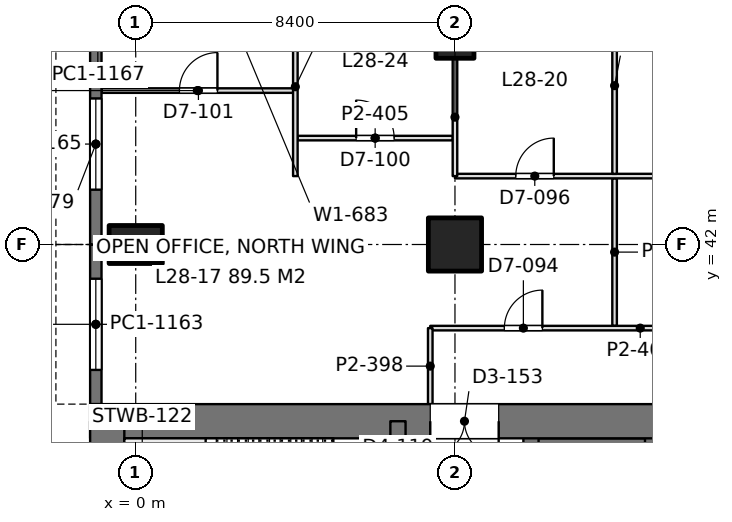
"""IFC4 building model, lengths in metres.
Left out: names, types, materials, properties, quantities, classifications, styles, units other than length and angle.
Written with IfcOpenShell. Run it as: python <this file> out.ifc"""

import sys

from ifc_helpers import new_model, si_unit, direction, frame, frame_2d, origin, origin_2d, place, context, subcontext, project, spatial, rectangle, extrude, element, fill, save


model = new_model("IFC4")
c1 = context("Model", 3, precision=1e-05, world=origin(), true_north=direction((0.0, 1.0)))
c2 = subcontext(c1, "Body", "Model", "MODEL_VIEW")
j1 = project(units=[si_unit("LENGTHUNIT", "METRE"), si_unit("PLANEANGLEUNIT", "RADIAN")], contexts=[c1])
p1 = place(None, origin())
s1 = spatial("IfcSite", under=j1, at=p1, CompositionType="ELEMENT")
p2 = place(p1, origin())
s2 = spatial("IfcBuilding", under=s1, at=p2, CompositionType="ELEMENT")
p3 = place(p2, frame((0.0, 0.0, 126.0)))
s3 = spatial("IfcBuildingStorey", under=s2, at=p3, CompositionType="ELEMENT", Elevation=126.0)
p4 = place(p3, frame((0.0, 42.0, 0.0), z_axis=(0.0, 0.0, 1.0), x_axis=(0.0, 1.0, 0.0)))
e1 = element("IfcColumn", 1, at=p4, inside=s3, PredefinedType="COLUMN", context=c2, shape_type="SweptSolid", body=[
    extrude(rectangle(XDim=1.0, YDim=1.4, at=origin_2d()), origin(), (0.0, 0.0, 1.0), 4.2),
])
p5 = place(p3, frame((8.4, 42.0, 0.0), z_axis=(0.0, 0.0, 1.0), x_axis=(1.0, 0.0, 0.0)))
e2 = element("IfcColumn", 2, at=p5, inside=s3, PredefinedType="COLUMN", context=c2, shape_type="SweptSolid", body=[
    extrude(rectangle(XDim=1.4, YDim=1.4, at=origin_2d()), origin(), (0.0, 0.0, 1.0), 4.2),
])
p6 = place(p3, frame((8.4, 47.6, 0.0), z_axis=(0.0, 0.0, 1.0), x_axis=(1.0, 0.0, 0.0)))
e3 = element("IfcColumn", 3, at=p6, inside=s3, PredefinedType="COLUMN", context=c2, shape_type="SweptSolid", body=[
    extrude(rectangle(XDim=1.0, YDim=1.4, at=origin_2d()), origin(), (0.0, 0.0, 1.0), 4.2),
])
p7 = place(p3, frame((-1.2, 37.35, 0.0), z_axis=(0.0, 0.0, 1.0), x_axis=(1.0, 0.0, 0.0)))
e4 = element("IfcWall", 4, at=p7, inside=s3, PredefinedType="SHEAR", context=c2, shape_type="SweptSolid", body=[
    extrude(rectangle(XDim=18.0, YDim=0.9, at=frame_2d((9.0, 0.0))), origin(), (0.0, 0.0, 1.0), 4.2),
])
p8 = place(p7, frame((8.95, 0.0, 0.0)))
e5 = element("IfcOpeningElement", 5, at=p8, cuts=e4, PredefinedType="OPENING", context=c2, shape_type="SweptSolid", body=[
    extrude(rectangle(XDim=1.8, YDim=2.4, at=frame_2d((0.9, 1.2))), frame((0.0, 0.46, 0.0), z_axis=(0.0, -1.0, 0.0), x_axis=(1.0, 0.0, 0.0)), (0.0, 0.0, 1.0), 0.92),
])
p9 = place(p3, frame((-0.75, 13.05, 0.0), z_axis=(0.0, 0.0, 1.0), x_axis=(0.0, 1.0, 0.0)))
e6 = element("IfcWall", 6, at=p9, inside=s3, PredefinedType="SHEAR", context=c2, shape_type="SweptSolid", body=[
    extrude(rectangle(XDim=24.3, YDim=0.9, at=frame_2d((12.15, 0.0))), origin(), (0.0, 0.0, 1.0), 4.2),
])
p10 = place(p3, frame((6.9, 13.05, 0.0), z_axis=(0.0, 0.0, 1.0), x_axis=(0.0, 1.0, 0.0)))
e7 = element("IfcWall", 7, at=p10, inside=s3, PredefinedType="SHEAR", context=c2, shape_type="SweptSolid", body=[
    extrude(rectangle(XDim=24.3, YDim=0.4, at=frame_2d((12.15, 0.0))), origin(), (0.0, 0.0, 1.0), 4.2),
])
p11 = place(p10, frame((1.3, 0.0, 0.0)))
e8 = element("IfcOpeningElement", 8, at=p11, cuts=e7, PredefinedType="OPENING", context=c2, shape_type="SweptSolid", body=[
    extrude(rectangle(XDim=1.0, YDim=2.2, at=frame_2d((0.5, 1.1))), frame((0.0, 0.21, 0.0), z_axis=(0.0, -1.0, 0.0), x_axis=(1.0, 0.0, 0.0)), (0.0, 0.0, 1.0), 0.42),
])
p12 = place(p10, frame((22.0, 0.0, 0.0)))
e9 = element("IfcOpeningElement", 9, at=p12, cuts=e7, PredefinedType="OPENING", context=c2, shape_type="SweptSolid", body=[
    extrude(rectangle(XDim=1.0, YDim=2.2, at=frame_2d((0.5, 1.1))), frame((0.0, 0.21, 0.0), z_axis=(0.0, -1.0, 0.0), x_axis=(1.0, 0.0, 0.0)), (0.0, 0.0, 1.0), 0.42),
])
p13 = place(p10, frame((5.55, 0.0, 0.0)))
e10 = element("IfcOpeningElement", 10, at=p13, cuts=e7, PredefinedType="OPENING", context=c2, shape_type="SweptSolid", body=[
    extrude(rectangle(XDim=1.0, YDim=2.2, at=frame_2d((0.5, 1.1))), frame((0.0, 0.21, 0.0), z_axis=(0.0, -1.0, 0.0), x_axis=(1.0, 0.0, 0.0)), (0.0, 0.0, 1.0), 0.42),
])
p14 = place(p10, frame((9.55, 0.0, 0.0)))
e11 = element("IfcOpeningElement", 11, at=p14, cuts=e7, PredefinedType="OPENING", context=c2, shape_type="SweptSolid", body=[
    extrude(rectangle(XDim=1.0, YDim=2.2, at=frame_2d((0.5, 1.1))), frame((0.0, 0.21, 0.0), z_axis=(0.0, -1.0, 0.0), x_axis=(1.0, 0.0, 0.0)), (0.0, 0.0, 1.0), 0.42),
])
p15 = place(p10, frame((12.8, 0.0, 0.0)))
e12 = element("IfcOpeningElement", 12, at=p15, cuts=e7, PredefinedType="OPENING", context=c2, shape_type="SweptSolid", body=[
    extrude(rectangle(XDim=1.1, YDim=2.2, at=frame_2d((0.55, 1.1))), frame((0.0, 0.21, 0.0), z_axis=(0.0, -1.0, 0.0), x_axis=(1.0, 0.0, 0.0)), (0.0, 0.0, 1.0), 0.42),
])
p16 = place(p10, frame((15.538, 0.0, 0.0)))
e13 = element("IfcOpeningElement", 13, at=p16, cuts=e7, PredefinedType="OPENING", context=c2, shape_type="SweptSolid", body=[
    extrude(rectangle(XDim=1.1, YDim=2.2, at=frame_2d((0.55, 1.1))), frame((0.0, 0.21, 0.0), z_axis=(0.0, -1.0, 0.0), x_axis=(1.0, 0.0, 0.0)), (0.0, 0.0, 1.0), 0.42),
])
p17 = place(p10, frame((18.262, 0.0, 0.0)))
e14 = element("IfcOpeningElement", 14, at=p17, cuts=e7, PredefinedType="OPENING", context=c2, shape_type="SweptSolid", body=[
    extrude(rectangle(XDim=1.1, YDim=2.2, at=frame_2d((0.55, 1.1))), frame((0.0, 0.21, 0.0), z_axis=(0.0, -1.0, 0.0), x_axis=(1.0, 0.0, 0.0)), (0.0, 0.0, 1.0), 0.42),
])
p18 = place(p3, frame((10.4, 13.05, 0.0), z_axis=(0.0, 0.0, 1.0), x_axis=(0.0, 1.0, 0.0)))
e15 = element("IfcWall", 15, at=p18, inside=s3, PredefinedType="SHEAR", context=c2, shape_type="SweptSolid", body=[
    extrude(rectangle(XDim=24.3, YDim=0.4, at=frame_2d((12.15, 0.0))), origin(), (0.0, 0.0, 1.0), 4.2),
])
p19 = place(p18, frame((10.05, 0.0, 0.0)))
e16 = element("IfcOpeningElement", 16, at=p19, cuts=e15, PredefinedType="OPENING", context=c2, shape_type="SweptSolid", body=[
    extrude(rectangle(XDim=1.1, YDim=2.2, at=frame_2d((0.55, 1.1))), frame((0.0, 0.21, 0.0), z_axis=(0.0, -1.0, 0.0), x_axis=(1.0, 0.0, 0.0)), (0.0, 0.0, 1.0), 0.42),
])
p20 = place(p18, frame((12.9, 0.0, 0.0)))
e17 = element("IfcOpeningElement", 17, at=p20, cuts=e15, PredefinedType="OPENING", context=c2, shape_type="SweptSolid", body=[
    extrude(rectangle(XDim=1.1, YDim=2.2, at=frame_2d((0.55, 1.1))), frame((0.0, 0.21, 0.0), z_axis=(0.0, -1.0, 0.0), x_axis=(1.0, 0.0, 0.0)), (0.0, 0.0, 1.0), 0.42),
])
p21 = place(p18, frame((21.45, 0.0, 0.0)))
e18 = element("IfcOpeningElement", 18, at=p21, cuts=e15, PredefinedType="OPENING", context=c2, shape_type="SweptSolid", body=[
    extrude(rectangle(XDim=1.1, YDim=2.2, at=frame_2d((0.55, 1.1))), frame((0.0, 0.21, 0.0), z_axis=(0.0, -1.0, 0.0), x_axis=(1.0, 0.0, 0.0)), (0.0, 0.0, 1.0), 0.42),
])
p22 = place(p18, frame((2.35, 0.0, 0.0)))
e19 = element("IfcOpeningElement", 19, at=p22, cuts=e15, PredefinedType="OPENING", context=c2, shape_type="SweptSolid", body=[
    extrude(rectangle(XDim=1.8, YDim=2.4, at=frame_2d((0.9, 1.2))), frame((0.0, 0.21, 0.0), z_axis=(0.0, -1.0, 0.0), x_axis=(1.0, 0.0, 0.0)), (0.0, 0.0, 1.0), 0.42),
])
p23 = place(p18, frame((5.8, 0.0, 0.0)))
e20 = element("IfcOpeningElement", 20, at=p23, cuts=e15, PredefinedType="OPENING", context=c2, shape_type="SweptSolid", body=[
    extrude(rectangle(XDim=1.8, YDim=2.4, at=frame_2d((0.9, 1.2))), frame((0.0, 0.21, 0.0), z_axis=(0.0, -1.0, 0.0), x_axis=(1.0, 0.0, 0.0)), (0.0, 0.0, 1.0), 0.42),
])
p24 = place(p3, frame((13.6, 22.225, 0.0), z_axis=(0.0, 0.0, 1.0), x_axis=(0.0, 1.0, 0.0)))
e21 = element("IfcWall", 21, at=p24, inside=s3, PredefinedType="SHEAR", context=c2, shape_type="SweptSolid", body=[
    extrude(rectangle(XDim=15.125, YDim=0.4, at=frame_2d((7.562, 0.0))), origin(), (0.0, 0.0, 1.0), 4.2),
])
p25 = place(p3, frame((10.4, 36.625, 0.0), z_axis=(0.0, 0.0, 1.0), x_axis=(1.0, 0.0, 0.0)))
e22 = element("IfcWall", 22, at=p25, inside=s3, PredefinedType="SHEAR", context=c2, shape_type="SweptSolid", body=[
    extrude(rectangle(XDim=3.2, YDim=0.55, at=frame_2d((1.6, 0.0))), origin(), (0.0, 0.0, 1.0), 4.2),
])
p26 = place(p3, frame((-1.05, 37.8, 0.0), z_axis=(0.0, 0.0, 1.0), x_axis=(0.0, 1.0, 0.0)))
e23 = element("IfcWall", 23, at=p26, inside=s3, PredefinedType="SOLIDWALL", context=c2, shape_type="SweptSolid", body=[
    extrude(rectangle(XDim=4.2, YDim=0.3, at=frame_2d((2.1, 0.0))), origin(), (0.0, 0.0, 1.0), 4.05),
])
p27 = place(p26, frame((0.9, 0.0, 0.9)))
e24 = element("IfcOpeningElement", 24, at=p27, cuts=e23, PredefinedType="OPENING", context=c2, shape_type="SweptSolid", body=[
    extrude(rectangle(XDim=2.4, YDim=1.9, at=frame_2d((1.2, 0.95))), frame((0.0, 0.16, 0.0), z_axis=(0.0, -1.0, 0.0), x_axis=(1.0, 0.0, 0.0)), (0.0, 0.0, 1.0), 0.32),
])
p28 = place(p3, frame((-1.05, 42.0, 0.0), z_axis=(0.0, 0.0, 1.0), x_axis=(0.0, 1.0, 0.0)))
e25 = element("IfcWall", 25, at=p28, inside=s3, PredefinedType="SOLIDWALL", context=c2, shape_type="SweptSolid", body=[
    extrude(rectangle(XDim=5.285, YDim=0.3, at=frame_2d((2.643, 0.0))), origin(), (0.0, 0.0, 1.0), 4.05),
])
p29 = place(p28, frame((1.443, 0.0, 0.9)))
e26 = element("IfcOpeningElement", 26, at=p29, cuts=e25, PredefinedType="OPENING", context=c2, shape_type="SweptSolid", body=[
    extrude(rectangle(XDim=2.4, YDim=1.9, at=frame_2d((1.2, 0.95))), frame((0.0, 0.16, 0.0), z_axis=(0.0, -1.0, 0.0), x_axis=(1.0, 0.0, 0.0)), (0.0, 0.0, 1.0), 0.32),
])
p30 = place(p3, frame((-0.902, 46.05, 0.0), z_axis=(0.0, 0.0, 1.0), x_axis=(1.0, 0.0, 0.0)))
e27 = element("IfcWall", 27, at=p30, inside=s3, PredefinedType="PARTITIONING", context=c2, shape_type="SweptSolid", body=[
    extrude(rectangle(XDim=5.044, YDim=0.12, at=frame_2d((2.522, 0.0))), origin(), (0.0, 0.0, 1.0), 3.56),
])
p31 = place(p30, frame((2.052, 0.0, 0.0)))
e28 = element("IfcOpeningElement", 28, at=p31, cuts=e27, PredefinedType="OPENING", context=c2, shape_type="SweptSolid", body=[
    extrude(rectangle(XDim=1.0, YDim=2.4, at=frame_2d((0.5, 1.2))), frame((0.0, 0.07, 0.0), z_axis=(0.0, -1.0, 0.0), x_axis=(1.0, 0.0, 0.0)), (0.0, 0.0, 1.0), 0.14),
])
p32 = place(p3, frame((4.258, 44.8, 0.0), z_axis=(0.0, 0.0, 1.0), x_axis=(1.0, 0.0, 0.0)))
e29 = element("IfcWall", 29, at=p32, inside=s3, PredefinedType="PARTITIONING", context=c2, shape_type="SweptSolid", body=[
    extrude(rectangle(XDim=4.084, YDim=0.12, at=frame_2d((2.042, 0.0))), origin(), (0.0, 0.0, 1.0), 3.55),
])
p33 = place(p32, frame((1.542, 0.0, 0.0)))
e30 = element("IfcOpeningElement", 30, at=p33, cuts=e29, PredefinedType="OPENING", context=c2, shape_type="SweptSolid", body=[
    extrude(rectangle(XDim=1.0, YDim=2.4, at=frame_2d((0.5, 1.2))), frame((0.0, 0.07, 0.0), z_axis=(0.0, -1.0, 0.0), x_axis=(1.0, 0.0, 0.0)), (0.0, 0.0, 1.0), 0.14),
])
p34 = place(p3, frame((8.4, 43.8, 0.0), z_axis=(0.0, 0.0, 1.0), x_axis=(1.0, 0.0, 0.0)))
e31 = element("IfcWall", 31, at=p34, inside=s3, PredefinedType="PARTITIONING", context=c2, shape_type="SweptSolid", body=[
    extrude(rectangle(XDim=16.8, YDim=0.12, at=frame_2d((8.4, 0.0))), origin(), (0.0, 0.0, 1.0), 3.55),
])
p35 = place(p34, frame((1.6, 0.0, 0.0)))
e32 = element("IfcOpeningElement", 32, at=p35, cuts=e31, PredefinedType="OPENING", context=c2, shape_type="SweptSolid", body=[
    extrude(rectangle(XDim=1.0, YDim=2.4, at=frame_2d((0.5, 1.2))), frame((0.0, 0.07, 0.0), z_axis=(0.0, -1.0, 0.0), x_axis=(1.0, 0.0, 0.0)), (0.0, 0.0, 1.0), 0.14),
])
p36 = place(p34, frame((5.8, 0.0, 0.0)))
e33 = element("IfcOpeningElement", 33, at=p36, cuts=e31, PredefinedType="OPENING", context=c2, shape_type="SweptSolid", body=[
    extrude(rectangle(XDim=1.0, YDim=2.4, at=frame_2d((0.5, 1.2))), frame((0.0, 0.07, 0.0), z_axis=(0.0, -1.0, 0.0), x_axis=(1.0, 0.0, 0.0)), (0.0, 0.0, 1.0), 0.14),
])
p37 = place(p34, frame((10.0, 0.0, 0.0)))
e34 = element("IfcOpeningElement", 34, at=p37, cuts=e31, PredefinedType="OPENING", context=c2, shape_type="SweptSolid", body=[
    extrude(rectangle(XDim=1.0, YDim=2.4, at=frame_2d((0.5, 1.2))), frame((0.0, 0.07, 0.0), z_axis=(0.0, -1.0, 0.0), x_axis=(1.0, 0.0, 0.0)), (0.0, 0.0, 1.0), 0.14),
])
p38 = place(p34, frame((14.2, 0.0, 0.0)))
e35 = element("IfcOpeningElement", 35, at=p38, cuts=e31, PredefinedType="OPENING", context=c2, shape_type="SweptSolid", body=[
    extrude(rectangle(XDim=1.0, YDim=2.4, at=frame_2d((0.5, 1.2))), frame((0.0, 0.07, 0.0), z_axis=(0.0, -1.0, 0.0), x_axis=(1.0, 0.0, 0.0)), (0.0, 0.0, 1.0), 0.14),
])
p39 = place(p3, frame((4.2, 43.8, 0.0), z_axis=(0.0, 0.0, 1.0), x_axis=(0.0, 1.0, 0.0)))
e36 = element("IfcWall", 36, at=p39, inside=s3, PredefinedType="PARTITIONING", context=c2, shape_type="SweptSolid", body=[
    extrude(rectangle(XDim=4.702, YDim=0.12, at=frame_2d((2.351, 0.0))), origin(), (0.0, 0.0, 1.0), 3.56),
])
p40 = place(p3, frame((8.4, 43.8, 0.0), z_axis=(0.0, 0.0, 1.0), x_axis=(0.0, 1.0, 0.0)))
e37 = element("IfcWall", 37, at=p40, inside=s3, PredefinedType="PARTITIONING", context=c2, shape_type="SweptSolid", body=[
    extrude(rectangle(XDim=3.101, YDim=0.12, at=frame_2d((1.55, 0.0))), origin(), (0.0, 0.0, 1.0), 3.55),
])
p41 = place(p3, frame((12.6, 43.858, 0.0), z_axis=(0.0, 0.0, 1.0), x_axis=(0.0, 1.0, 0.0)))
e38 = element("IfcWall", 38, at=p41, inside=s3, PredefinedType="PARTITIONING", context=c2, shape_type="SweptSolid", body=[
    extrude(rectangle(XDim=4.644, YDim=0.12, at=frame_2d((2.322, 0.0))), origin(), (0.0, 0.0, 1.0), 3.56),
])
p42 = place(p3, frame((12.6, 39.858, 0.0), z_axis=(0.0, 0.0, 1.0), x_axis=(0.0, 1.0, 0.0)))
e39 = element("IfcWall", 39, at=p42, inside=s3, PredefinedType="PARTITIONING", context=c2, shape_type="SweptSolid", body=[
    extrude(rectangle(XDim=3.884, YDim=0.12, at=frame_2d((1.942, 0.0))), origin(), (0.0, 0.0, 1.0), 3.55),
])
p43 = place(p3, frame((7.75, 39.8, 0.0), z_axis=(0.0, 0.0, 1.0), x_axis=(1.0, 0.0, 0.0)))
e40 = element("IfcWall", 40, at=p43, inside=s3, PredefinedType="PARTITIONING", context=c2, shape_type="SweptSolid", body=[
    extrude(rectangle(XDim=11.05, YDim=0.12, at=frame_2d((5.525, 0.0))), origin(), (0.0, 0.0, 1.0), 3.69),
])
p44 = place(p43, frame((1.95, 0.0, 0.0)))
e41 = element("IfcOpeningElement", 41, at=p44, cuts=e40, PredefinedType="OPENING", context=c2, shape_type="SweptSolid", body=[
    extrude(rectangle(XDim=1.0, YDim=2.4, at=frame_2d((0.5, 1.2))), frame((0.0, 0.07, 0.0), z_axis=(0.0, -1.0, 0.0), x_axis=(1.0, 0.0, 0.0)), (0.0, 0.0, 1.0), 0.14),
])
p45 = place(p43, frame((6.95, 0.0, 0.0)))
e42 = element("IfcOpeningElement", 42, at=p45, cuts=e40, PredefinedType="OPENING", context=c2, shape_type="SweptSolid", body=[
    extrude(rectangle(XDim=1.8, YDim=2.2, at=frame_2d((0.9, 1.1))), frame((0.0, 0.07, 0.0), z_axis=(0.0, -1.0, 0.0), x_axis=(1.0, 0.0, 0.0)), (0.0, 0.0, 1.0), 0.14),
])
p46 = place(p3, frame((7.75, 37.8, 0.0), z_axis=(0.0, 0.0, 1.0), x_axis=(0.0, 1.0, 0.0)))
e43 = element("IfcWall", 43, at=p46, inside=s3, PredefinedType="PARTITIONING", context=c2, shape_type="SweptSolid", body=[
    extrude(rectangle(XDim=2.0, YDim=0.12, at=frame_2d((1.0, 0.0))), origin(), (0.0, 0.0, 1.0), 4.05),
])
p47 = place(p27, origin())
e44 = element("IfcWindow", 44, at=p47, inside=s3, PartitioningType="SINGLE_PANEL", PredefinedType="WINDOW", context=c2, shape_type="SweptSolid", body=[
    extrude(rectangle(XDim=2.4, YDim=1.9, at=frame_2d((1.2, 0.95))), frame((0.0, 0.03, 0.0), z_axis=(0.0, -1.0, 0.0), x_axis=(1.0, 0.0, 0.0)), (0.0, 0.0, 1.0), 0.06),
])
fill(e24, e44)
p48 = place(p29, origin())
e45 = element("IfcWindow", 45, at=p48, inside=s3, PartitioningType="SINGLE_PANEL", PredefinedType="WINDOW", context=c2, shape_type="SweptSolid", body=[
    extrude(rectangle(XDim=2.4, YDim=1.9, at=frame_2d((1.2, 0.95))), frame((0.0, 0.03, 0.0), z_axis=(0.0, -1.0, 0.0), x_axis=(1.0, 0.0, 0.0)), (0.0, 0.0, 1.0), 0.06),
])
fill(e26, e45)
p49 = place(p8, frame((1.8, 0.0, 0.0), z_axis=(0.0, 0.0, 1.0), x_axis=(-1.0, 0.0, 0.0)))
e46 = element("IfcDoor", 46, at=p49, inside=s3, OperationType="DOUBLE_DOOR_SINGLE_SWING", PredefinedType="DOOR", context=c2, shape_type="SweptSolid", body=[
    extrude(rectangle(XDim=1.8, YDim=2.4, at=frame_2d((0.9, 1.2))), frame((0.0, 0.025, 0.0), z_axis=(0.0, -1.0, 0.0), x_axis=(1.0, 0.0, 0.0)), (0.0, 0.0, 1.0), 0.05),
])
fill(e5, e46)
p50 = place(p31, origin())
e47 = element("IfcDoor", 47, at=p50, inside=s3, OperationType="SINGLE_SWING_RIGHT", PredefinedType="DOOR", context=c2, shape_type="SweptSolid", body=[
    extrude(rectangle(XDim=1.0, YDim=2.4, at=frame_2d((0.5, 1.2))), frame((0.0, 0.025, 0.0), z_axis=(0.0, -1.0, 0.0), x_axis=(1.0, 0.0, 0.0)), (0.0, 0.0, 1.0), 0.05),
])
fill(e28, e47)
p51 = place(p33, origin())
e48 = element("IfcDoor", 48, at=p51, inside=s3, OperationType="SINGLE_SWING_LEFT", PredefinedType="DOOR", context=c2, shape_type="SweptSolid", body=[
    extrude(rectangle(XDim=1.0, YDim=2.4, at=frame_2d((0.5, 1.2))), frame((0.0, 0.025, 0.0), z_axis=(0.0, -1.0, 0.0), x_axis=(1.0, 0.0, 0.0)), (0.0, 0.0, 1.0), 0.05),
])
fill(e30, e48)
p52 = place(p35, origin())
e49 = element("IfcDoor", 49, at=p52, inside=s3, OperationType="SINGLE_SWING_RIGHT", PredefinedType="DOOR", context=c2, shape_type="SweptSolid", body=[
    extrude(rectangle(XDim=1.0, YDim=2.4, at=frame_2d((0.5, 1.2))), frame((0.0, 0.025, 0.0), z_axis=(0.0, -1.0, 0.0), x_axis=(1.0, 0.0, 0.0)), (0.0, 0.0, 1.0), 0.05),
])
fill(e32, e49)
p53 = place(p44, origin())
e50 = element("IfcDoor", 50, at=p53, inside=s3, OperationType="SINGLE_SWING_RIGHT", PredefinedType="DOOR", context=c2, shape_type="SweptSolid", body=[
    extrude(rectangle(XDim=1.0, YDim=2.4, at=frame_2d((0.5, 1.2))), frame((0.0, 0.025, 0.0), z_axis=(0.0, -1.0, 0.0), x_axis=(1.0, 0.0, 0.0)), (0.0, 0.0, 1.0), 0.05),
])
fill(e41, e50)
save(model, sys.argv[1])
